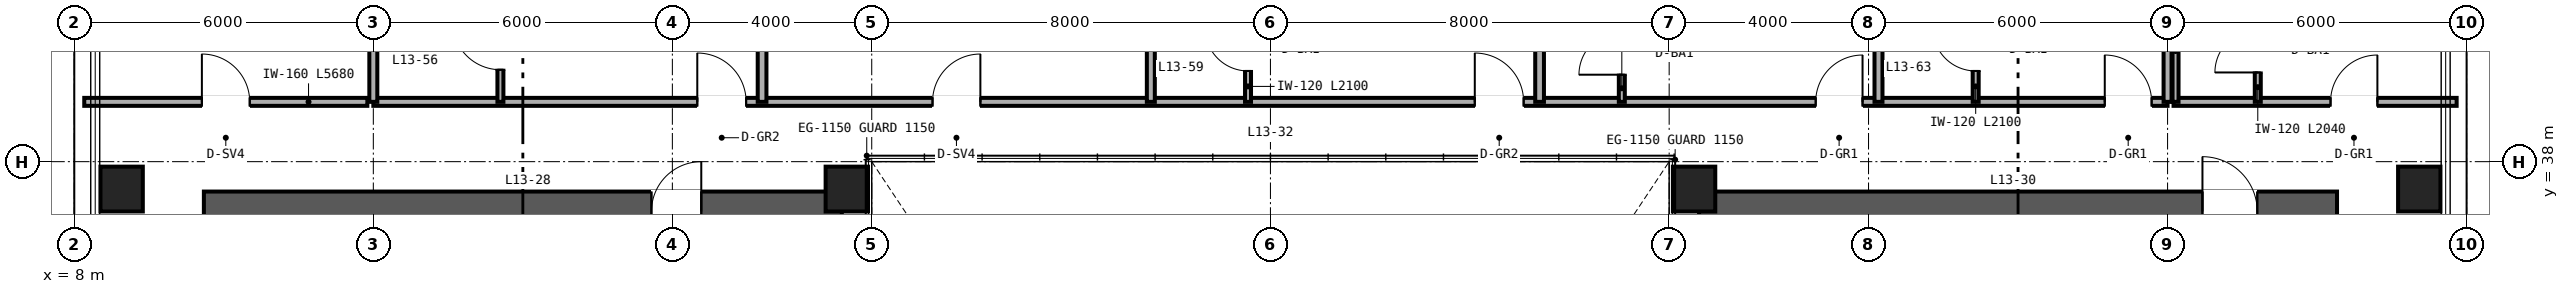
"""IFC4 building model, lengths in metres.
Left out: names, types, materials, properties, quantities, classifications, styles, units other than length and angle.
Written with IfcOpenShell. Run it as: python <this file> out.ifc"""

import sys

from ifc_helpers import new_model, si_unit, direction, frame, frame_2d, origin, origin_2d, place, context, subcontext, project, spatial, rectangle, hollow_rectangle, extrude, source, transform, mapped, element, fill, save


model = new_model("IFC4")
c1 = context("Model", 3, precision=1e-05, world=origin(), true_north=direction((0.0, 1.0)))
c2 = subcontext(c1, "Body", "Model", "MODEL_VIEW")
j1 = project(units=[si_unit("LENGTHUNIT", "METRE"), si_unit("PLANEANGLEUNIT", "RADIAN")], contexts=[c1])
p1 = place(None, origin())
s1 = spatial("IfcSite", under=j1, at=p1, CompositionType="ELEMENT")
p2 = place(p1, origin())
s2 = spatial("IfcBuilding", under=s1, at=p2, CompositionType="ELEMENT")
p3 = place(p2, frame((0.0, 0.0, 56.4)))
s3 = spatial("IfcBuildingStorey", under=s2, at=p3, CompositionType="ELEMENT", Elevation=56.4)
p4 = place(p3, frame((10.6, 37.0, 0.0), z_axis=(0.0, 0.0, 1.0), x_axis=(1.0, 0.0, 0.0)))
e1 = element("IfcWall", 1, at=p4, inside=s3, PredefinedType="SHEAR", context=c2, shape_type="SweptSolid", body=[
    extrude(rectangle(XDim=12.8, YDim=0.8, at=frame_2d((6.4, 0.0))), origin(), (0.0, 0.0, 1.0), 3.35),
])
p5 = place(p4, frame((8.98, 0.0, 0.0)))
e2 = element("IfcOpeningElement", 2, at=p5, cuts=e1, PredefinedType="OPENING", context=c2, shape_type="SweptSolid", body=[
    extrude(rectangle(XDim=1.0, YDim=2.15, at=frame_2d((0.5, 1.075))), frame((0.0, 0.41, 0.0), z_axis=(0.0, -1.0, 0.0), x_axis=(1.0, 0.0, 0.0)), (0.0, 0.0, 1.0), 0.82),
])
p6 = place(p3, frame((40.6, 37.0, 0.0), z_axis=(0.0, 0.0, 1.0), x_axis=(1.0, 0.0, 0.0)))
e3 = element("IfcWall", 3, at=p6, inside=s3, PredefinedType="SHEAR", context=c2, shape_type="SweptSolid", body=[
    extrude(rectangle(XDim=12.8, YDim=0.8, at=frame_2d((6.4, 0.0))), origin(), (0.0, 0.0, 1.0), 3.35),
])
p7 = place(p6, frame((10.1, 0.0, 0.0)))
e4 = element("IfcOpeningElement", 4, at=p7, cuts=e3, PredefinedType="OPENING", context=c2, shape_type="SweptSolid", body=[
    extrude(rectangle(XDim=1.1, YDim=2.15, at=frame_2d((0.55, 1.075))), frame((0.0, 0.41, 0.0), z_axis=(0.0, -1.0, 0.0), x_axis=(1.0, 0.0, 0.0)), (0.0, 0.0, 1.0), 0.82),
])
m1 = source(origin(), c2, "Body", "SweptSolid", [
    extrude(hollow_rectangle(XDim=0.85, YDim=0.9, WallThickness=0.04, at=origin_2d()), origin(), (0.0, 0.0, 1.0), 3.35),
])
for number, where, z_axis, x_axis in (
    (5, (8.95, 37.45, 0.0), (0.0, 0.0, 1.0), (1.0, 0.0, 0.0)),
    (6, (23.5, 37.45, 0.0), (0.0, 0.0, 1.0), (1.0, 0.0, 0.0)),
    (7, (40.5, 37.45, 0.0), (0.0, 0.0, 1.0), (1.0, 0.0, 0.0)),
    (8, (55.05, 37.45, 0.0), (0.0, 0.0, 1.0), (1.0, 0.0, 0.0)),
):
    element("IfcColumn", number, at=place(p3, frame(where, z_axis=z_axis, x_axis=x_axis)), inside=s3, PredefinedType="COLUMN", context=c2, shape_type="MappedRepresentation", body=[
        mapped(m1, transform((0.0, 0.0, 0.0), scale=1.0)),
    ])
p8 = place(p3, frame((8.2, 39.2, 0.0), z_axis=(0.0, 0.0, 1.0), x_axis=(1.0, 0.0, 0.0)))
e9 = element("IfcWall", 9, at=p8, inside=s3, PredefinedType="PARTITIONING", context=c2, shape_type="SweptSolid", body=[
    extrude(rectangle(XDim=5.68, YDim=0.16, at=frame_2d((2.84, 0.0))), origin(), (0.0, 0.0, 1.0), 3.35),
])
p9 = place(p8, frame((2.36, 0.0, 0.0)))
e10 = element("IfcOpeningElement", 10, at=p9, cuts=e9, PredefinedType="OPENING", context=c2, shape_type="SweptSolid", body=[
    extrude(rectangle(XDim=0.96, YDim=2.15, at=frame_2d((0.48, 1.075))), frame((0.0, 0.09, 0.0), z_axis=(0.0, -1.0, 0.0), x_axis=(1.0, 0.0, 0.0)), (0.0, 0.0, 1.0), 0.18),
])
p10 = place(p3, frame((50.12, 39.2, 0.0), z_axis=(0.0, 0.0, 1.0), x_axis=(1.0, 0.0, 0.0)))
e11 = element("IfcWall", 11, at=p10, inside=s3, PredefinedType="PARTITIONING", context=c2, shape_type="SweptSolid", body=[
    extrude(rectangle(XDim=5.68, YDim=0.16, at=frame_2d((2.84, 0.0))), origin(), (0.0, 0.0, 1.0), 3.35),
])
p11 = place(p10, frame((3.15, 0.0, 0.0)))
e12 = element("IfcOpeningElement", 12, at=p11, cuts=e11, PredefinedType="OPENING", context=c2, shape_type="SweptSolid", body=[
    extrude(rectangle(XDim=0.94, YDim=2.15, at=frame_2d((0.47, 1.075))), frame((0.0, 0.09, 0.0), z_axis=(0.0, -1.0, 0.0), x_axis=(1.0, 0.0, 0.0)), (0.0, 0.0, 1.0), 0.18),
])
p12 = place(p3, frame((51.81, 39.2, 0.0), z_axis=(0.0, 0.0, 1.0), x_axis=(0.0, 1.0, 0.0)))
e13 = element("IfcWall", 13, at=p12, inside=s3, PredefinedType="PARTITIONING", context=c2, shape_type="SweptSolid", body=[
    extrude(rectangle(XDim=2.04, YDim=0.12, at=frame_2d((1.02, 0.0))), origin(), (0.0, 0.0, 1.0), 3.35),
])
p13 = place(p12, frame((0.59, 0.0, 0.0)))
e14 = element("IfcOpeningElement", 14, at=p13, cuts=e13, PredefinedType="OPENING", context=c2, shape_type="SweptSolid", body=[
    extrude(rectangle(XDim=0.86, YDim=2.1, at=frame_2d((0.43, 1.05))), frame((0.0, 0.07, 0.0), z_axis=(0.0, -1.0, 0.0), x_axis=(1.0, 0.0, 0.0)), (0.0, 0.0, 1.0), 0.14),
])
p14 = place(p3, frame((50.16, 39.2, 0.0), z_axis=(0.0, 0.0, 1.0), x_axis=(0.0, 1.0, 0.0)))
e15 = element("IfcWall", 15, at=p14, inside=s3, PredefinedType="PARTITIONING", context=c2, shape_type="SweptSolid", body=[
    extrude(rectangle(XDim=2.04, YDim=0.12, at=frame_2d((1.02, 0.0))), origin(), (0.0, 0.0, 1.0), 3.35),
])
p15 = place(p3, frame((14.0, 39.2, 0.0), z_axis=(0.0, 0.0, 1.0), x_axis=(1.0, 0.0, 0.0)))
e16 = element("IfcWall", 16, at=p15, inside=s3, PredefinedType="PARTITIONING", context=c2, shape_type="SweptSolid", body=[
    extrude(rectangle(XDim=36.0, YDim=0.16, at=frame_2d((18.0, 0.0))), origin(), (0.0, 0.0, 1.0), 2.571),
])
p16 = place(p15, frame((6.5, 0.0, 0.0)))
e17 = element("IfcOpeningElement", 17, at=p16, cuts=e16, PredefinedType="OPENING", context=c2, shape_type="SweptSolid", body=[
    extrude(rectangle(XDim=0.98, YDim=2.2, at=frame_2d((0.49, 1.1))), frame((0.0, 0.09, 0.0), z_axis=(0.0, -1.0, 0.0), x_axis=(1.0, 0.0, 0.0)), (0.0, 0.0, 1.0), 0.18),
])
p17 = place(p15, frame((11.22, 0.0, 0.0)))
e18 = element("IfcOpeningElement", 18, at=p17, cuts=e16, PredefinedType="OPENING", context=c2, shape_type="SweptSolid", body=[
    extrude(rectangle(XDim=0.96, YDim=2.15, at=frame_2d((0.48, 1.075))), frame((0.0, 0.09, 0.0), z_axis=(0.0, -1.0, 0.0), x_axis=(1.0, 0.0, 0.0)), (0.0, 0.0, 1.0), 0.18),
])
p18 = place(p15, frame((22.1, 0.0, 0.0)))
e19 = element("IfcOpeningElement", 19, at=p18, cuts=e16, PredefinedType="OPENING", context=c2, shape_type="SweptSolid", body=[
    extrude(rectangle(XDim=0.98, YDim=2.2, at=frame_2d((0.49, 1.1))), frame((0.0, 0.09, 0.0), z_axis=(0.0, -1.0, 0.0), x_axis=(1.0, 0.0, 0.0)), (0.0, 0.0, 1.0), 0.18),
])
p19 = place(p15, frame((28.94, 0.0, 0.0)))
e20 = element("IfcOpeningElement", 20, at=p19, cuts=e16, PredefinedType="OPENING", context=c2, shape_type="SweptSolid", body=[
    extrude(rectangle(XDim=0.94, YDim=2.15, at=frame_2d((0.47, 1.075))), frame((0.0, 0.09, 0.0), z_axis=(0.0, -1.0, 0.0), x_axis=(1.0, 0.0, 0.0)), (0.0, 0.0, 1.0), 0.18),
])
p20 = place(p15, frame((34.74, 0.0, 0.0)))
e21 = element("IfcOpeningElement", 21, at=p20, cuts=e16, PredefinedType="OPENING", context=c2, shape_type="SweptSolid", body=[
    extrude(rectangle(XDim=0.94, YDim=2.15, at=frame_2d((0.47, 1.075))), frame((0.0, 0.09, 0.0), z_axis=(0.0, -1.0, 0.0), x_axis=(1.0, 0.0, 0.0)), (0.0, 0.0, 1.0), 0.18),
])
for number, where, z_axis, x_axis in (
    (22, (14.0, 39.2, 0.0), (0.0, 0.0, 1.0), (0.0, 1.0, 0.0)),
    (23, (50.0, 39.2, 0.0), (0.0, 0.0, 1.0), (0.0, 1.0, 0.0)),
):
    element("IfcWall", number, at=place(p3, frame(where, z_axis=z_axis, x_axis=x_axis)), inside=s3, PredefinedType="PARTITIONING", context=c2, shape_type="SweptSolid", body=[
        extrude(rectangle(XDim=10.44, YDim=0.16, at=frame_2d((5.22, 0.0))), origin(), (0.0, 0.0, 1.0), 2.657),
    ])
p21 = place(p3, frame((21.8, 39.2, 0.0), z_axis=(0.0, 0.0, 1.0), x_axis=(0.0, 1.0, 0.0)))
e24 = element("IfcWall", 24, at=p21, inside=s3, PredefinedType="PARTITIONING", context=c2, shape_type="SweptSolid", body=[
    extrude(rectangle(XDim=10.44, YDim=0.175, at=frame_2d((5.22, 0.0))), origin(), (0.0, 0.0, 1.0), 2.813),
])
p22 = place(p3, frame((16.55, 39.2, 0.0), z_axis=(0.0, 0.0, 1.0), x_axis=(0.0, 1.0, 0.0)))
e25 = element("IfcWall", 25, at=p22, inside=s3, PredefinedType="PARTITIONING", context=c2, shape_type="SweptSolid", body=[
    extrude(rectangle(XDim=2.25, YDim=0.12, at=frame_2d((1.125, 0.0))), origin(), (0.0, 0.0, 1.0), 3.35),
])
p23 = place(p22, frame((0.645, 0.0, 0.0)))
e26 = element("IfcOpeningElement", 26, at=p23, cuts=e25, PredefinedType="OPENING", context=c2, shape_type="SweptSolid", body=[
    extrude(rectangle(XDim=0.96, YDim=2.15, at=frame_2d((0.48, 1.075))), frame((0.0, 0.07, 0.0), z_axis=(0.0, -1.0, 0.0), x_axis=(1.0, 0.0, 0.0)), (0.0, 0.0, 1.0), 0.14),
])
p24 = place(p3, frame((29.6, 39.2, 0.0), z_axis=(0.0, 0.0, 1.0), x_axis=(0.0, 1.0, 0.0)))
e27 = element("IfcWall", 27, at=p24, inside=s3, PredefinedType="PARTITIONING", context=c2, shape_type="SweptSolid", body=[
    extrude(rectangle(XDim=10.44, YDim=0.16, at=frame_2d((5.22, 0.0))), origin(), (0.0, 0.0, 1.0), 2.423),
])
p25 = place(p3, frame((37.4, 39.2, 0.0), z_axis=(0.0, 0.0, 1.0), x_axis=(0.0, 1.0, 0.0)))
e28 = element("IfcWall", 28, at=p25, inside=s3, PredefinedType="PARTITIONING", context=c2, shape_type="SweptSolid", body=[
    extrude(rectangle(XDim=10.44, YDim=0.175, at=frame_2d((5.22, 0.0))), origin(), (0.0, 0.0, 1.0), 2.423),
])
p26 = place(p3, frame((31.55, 39.2, 0.0), z_axis=(0.0, 0.0, 1.0), x_axis=(0.0, 1.0, 0.0)))
e29 = element("IfcWall", 29, at=p26, inside=s3, PredefinedType="PARTITIONING", context=c2, shape_type="SweptSolid", body=[
    extrude(rectangle(XDim=2.1, YDim=0.12, at=frame_2d((1.05, 0.0))), origin(), (0.0, 0.0, 1.0), 3.35),
])
p27 = place(p26, frame((0.62, 0.0, 0.0)))
e30 = element("IfcOpeningElement", 30, at=p27, cuts=e29, PredefinedType="OPENING", context=c2, shape_type="SweptSolid", body=[
    extrude(rectangle(XDim=0.86, YDim=2.1, at=frame_2d((0.43, 1.05))), frame((0.0, 0.07, 0.0), z_axis=(0.0, -1.0, 0.0), x_axis=(1.0, 0.0, 0.0)), (0.0, 0.0, 1.0), 0.14),
])
p28 = place(p3, frame((44.2, 39.2, 0.0), z_axis=(0.0, 0.0, 1.0), x_axis=(0.0, 1.0, 0.0)))
e31 = element("IfcWall", 31, at=p28, inside=s3, PredefinedType="PARTITIONING", context=c2, shape_type="SweptSolid", body=[
    extrude(rectangle(XDim=10.44, YDim=0.16, at=frame_2d((5.22, 0.0))), origin(), (0.0, 0.0, 1.0), 2.657),
])
p29 = place(p3, frame((39.05, 39.2, 0.0), z_axis=(0.0, 0.0, 1.0), x_axis=(0.0, 1.0, 0.0)))
e32 = element("IfcWall", 32, at=p29, inside=s3, PredefinedType="PARTITIONING", context=c2, shape_type="SweptSolid", body=[
    extrude(rectangle(XDim=1.95, YDim=0.12, at=frame_2d((0.975, 0.0))), origin(), (0.0, 0.0, 1.0), 3.35),
])
p30 = place(p29, frame((0.545, 0.0, 0.0)))
e33 = element("IfcOpeningElement", 33, at=p30, cuts=e32, PredefinedType="OPENING", context=c2, shape_type="SweptSolid", body=[
    extrude(rectangle(XDim=0.86, YDim=2.1, at=frame_2d((0.43, 1.05))), frame((0.0, 0.07, 0.0), z_axis=(0.0, -1.0, 0.0), x_axis=(1.0, 0.0, 0.0)), (0.0, 0.0, 1.0), 0.14),
])
p31 = place(p3, frame((46.15, 39.2, 0.0), z_axis=(0.0, 0.0, 1.0), x_axis=(0.0, 1.0, 0.0)))
e34 = element("IfcWall", 34, at=p31, inside=s3, PredefinedType="PARTITIONING", context=c2, shape_type="SweptSolid", body=[
    extrude(rectangle(XDim=2.1, YDim=0.12, at=frame_2d((1.05, 0.0))), origin(), (0.0, 0.0, 1.0), 3.35),
])
p32 = place(p31, frame((0.62, 0.0, 0.0)))
e35 = element("IfcOpeningElement", 35, at=p32, cuts=e34, PredefinedType="OPENING", context=c2, shape_type="SweptSolid", body=[
    extrude(rectangle(XDim=0.86, YDim=2.1, at=frame_2d((0.43, 1.05))), frame((0.0, 0.07, 0.0), z_axis=(0.0, -1.0, 0.0), x_axis=(1.0, 0.0, 0.0)), (0.0, 0.0, 1.0), 0.14),
])
m2 = source(origin(), c2, "Body", "SweptSolid", [
    extrude(rectangle(XDim=1.0, YDim=2.15, at=frame_2d((0.5, 1.075))), frame((0.0, 0.025, 0.0), z_axis=(0.0, -1.0, 0.0), x_axis=(1.0, 0.0, 0.0)), (0.0, 0.0, 1.0), 0.05),
])
p33 = place(p5, origin())
e36 = element("IfcDoor", 36, at=p33, inside=s3, OperationType="SINGLE_SWING_RIGHT", PredefinedType="DOOR", context=c2, shape_type="MappedRepresentation", body=[
    mapped(m2, transform((0.0, 0.0, 0.0), scale=1.0)),
])
fill(e2, e36)
m3 = source(origin(), c2, "Body", "SweptSolid", [
    extrude(rectangle(XDim=1.1, YDim=2.15, at=frame_2d((0.55, 1.075))), frame((0.0, 0.025, 0.0), z_axis=(0.0, -1.0, 0.0), x_axis=(1.0, 0.0, 0.0)), (0.0, 0.0, 1.0), 0.05),
])
p34 = place(p7, origin())
e37 = element("IfcDoor", 37, at=p34, inside=s3, OperationType="SINGLE_SWING_LEFT", PredefinedType="DOOR", context=c2, shape_type="MappedRepresentation", body=[
    mapped(m3, transform((0.0, 0.0, 0.0), scale=1.0)),
])
fill(e4, e37)
m4 = source(origin(), c2, "Body", "SweptSolid", [
    extrude(rectangle(XDim=0.96, YDim=2.15, at=frame_2d((0.48, 1.075))), frame((0.0, 0.025, 0.0), z_axis=(0.0, -1.0, 0.0), x_axis=(1.0, 0.0, 0.0)), (0.0, 0.0, 1.0), 0.05),
])
p35 = place(p9, origin())
e38 = element("IfcDoor", 38, at=p35, inside=s3, OperationType="SINGLE_SWING_LEFT", PredefinedType="DOOR", context=c2, shape_type="MappedRepresentation", body=[
    mapped(m4, transform((0.0, 0.0, 0.0), scale=1.0)),
])
fill(e10, e38)
m5 = source(origin(), c2, "Body", "SweptSolid", [
    extrude(rectangle(XDim=0.86, YDim=2.1, at=frame_2d((0.43, 1.05))), frame((0.0, 0.025, 0.0), z_axis=(0.0, -1.0, 0.0), x_axis=(1.0, 0.0, 0.0)), (0.0, 0.0, 1.0), 0.05),
])
p36 = place(p13, origin())
e39 = element("IfcDoor", 39, at=p36, inside=s3, OperationType="SINGLE_SWING_LEFT", PredefinedType="DOOR", context=c2, shape_type="MappedRepresentation", body=[
    mapped(m5, transform((0.0, 0.0, 0.0), scale=1.0)),
])
fill(e14, e39)
m6 = source(origin(), c2, "Body", "SweptSolid", [
    extrude(rectangle(XDim=0.94, YDim=2.15, at=frame_2d((0.47, 1.075))), frame((0.0, 0.025, 0.0), z_axis=(0.0, -1.0, 0.0), x_axis=(1.0, 0.0, 0.0)), (0.0, 0.0, 1.0), 0.05),
])
p37 = place(p11, origin())
e40 = element("IfcDoor", 40, at=p37, inside=s3, OperationType="SINGLE_SWING_RIGHT", PredefinedType="DOOR", context=c2, shape_type="MappedRepresentation", body=[
    mapped(m6, transform((0.0, 0.0, 0.0), scale=1.0)),
])
fill(e12, e40)
p38 = place(p23, origin())
e41 = element("IfcDoor", 41, at=p38, inside=s3, OperationType="SINGLE_SWING_RIGHT", PredefinedType="DOOR", context=c2, shape_type="MappedRepresentation", body=[
    mapped(m4, transform((0.0, 0.0, 0.0), scale=1.0)),
])
fill(e26, e41)
p39 = place(p27, origin())
e42 = element("IfcDoor", 42, at=p39, inside=s3, OperationType="SINGLE_SWING_RIGHT", PredefinedType="DOOR", context=c2, shape_type="MappedRepresentation", body=[
    mapped(m5, transform((0.0, 0.0, 0.0), scale=1.0)),
])
fill(e30, e42)
p40 = place(p30, origin())
e43 = element("IfcDoor", 43, at=p40, inside=s3, OperationType="SINGLE_SWING_LEFT", PredefinedType="DOOR", context=c2, shape_type="MappedRepresentation", body=[
    mapped(m5, transform((0.0, 0.0, 0.0), scale=1.0)),
])
fill(e33, e43)
p41 = place(p32, origin())
e44 = element("IfcDoor", 44, at=p41, inside=s3, OperationType="SINGLE_SWING_RIGHT", PredefinedType="DOOR", context=c2, shape_type="MappedRepresentation", body=[
    mapped(m5, transform((0.0, 0.0, 0.0), scale=1.0)),
])
fill(e35, e44)
m7 = source(origin(), c2, "Body", "SweptSolid", [
    extrude(rectangle(XDim=0.98, YDim=2.2, at=frame_2d((0.49, 1.1))), frame((0.0, 0.025, 0.0), z_axis=(0.0, -1.0, 0.0), x_axis=(1.0, 0.0, 0.0)), (0.0, 0.0, 1.0), 0.05),
])
p42 = place(p16, origin())
e45 = element("IfcDoor", 45, at=p42, inside=s3, OperationType="SINGLE_SWING_LEFT", PredefinedType="DOOR", context=c2, shape_type="MappedRepresentation", body=[
    mapped(m7, transform((0.0, 0.0, 0.0), scale=1.0)),
])
fill(e17, e45)
p43 = place(p17, origin())
e46 = element("IfcDoor", 46, at=p43, inside=s3, OperationType="SINGLE_SWING_RIGHT", PredefinedType="DOOR", context=c2, shape_type="MappedRepresentation", body=[
    mapped(m4, transform((0.0, 0.0, 0.0), scale=1.0)),
])
fill(e18, e46)
p44 = place(p18, origin())
e47 = element("IfcDoor", 47, at=p44, inside=s3, OperationType="SINGLE_SWING_LEFT", PredefinedType="DOOR", context=c2, shape_type="MappedRepresentation", body=[
    mapped(m7, transform((0.0, 0.0, 0.0), scale=1.0)),
])
fill(e19, e47)
p45 = place(p19, origin())
e48 = element("IfcDoor", 48, at=p45, inside=s3, OperationType="SINGLE_SWING_RIGHT", PredefinedType="DOOR", context=c2, shape_type="MappedRepresentation", body=[
    mapped(m6, transform((0.0, 0.0, 0.0), scale=1.0)),
])
fill(e20, e48)
p46 = place(p20, origin())
e49 = element("IfcDoor", 49, at=p46, inside=s3, OperationType="SINGLE_SWING_LEFT", PredefinedType="DOOR", context=c2, shape_type="MappedRepresentation", body=[
    mapped(m6, transform((0.0, 0.0, 0.0), scale=1.0)),
])
fill(e21, e49)
save(model, sys.argv[1])
